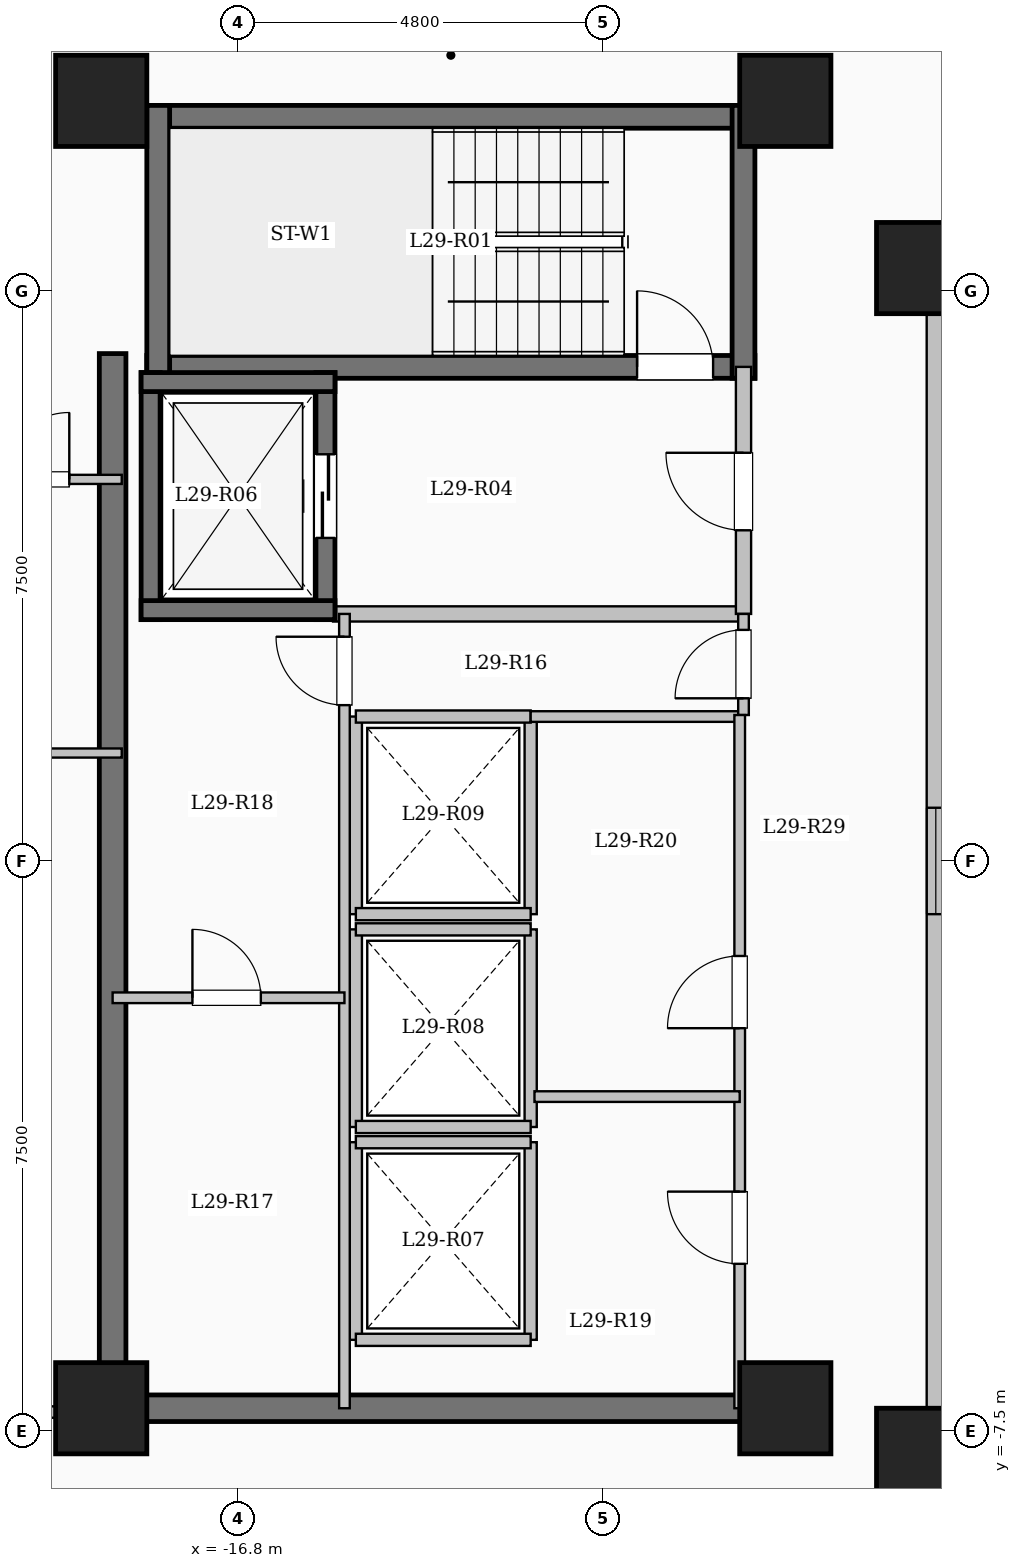
"""IFC4 building model, lengths in metres.
Left out: names, types, materials, properties, quantities, classifications, styles, units other than length and angle.
Written with IfcOpenShell. Run it as: python <this file> out.ifc"""

import sys

from ifc_helpers import new_model, si_unit, direction, frame, frame_2d, origin, origin_2d, place, context, subcontext, project, spatial, rectangle, extrude, element, fill, save


model = new_model("IFC4")
c1 = context("Model", 3, precision=1e-05, world=origin(), true_north=direction((0.0, 1.0)))
c2 = subcontext(c1, "Body", "Model", "MODEL_VIEW")
j1 = project(units=[si_unit("LENGTHUNIT", "METRE"), si_unit("PLANEANGLEUNIT", "RADIAN")], contexts=[c1])
p1 = place(None, origin())
s1 = spatial("IfcSite", under=j1, at=p1, CompositionType="ELEMENT")
p2 = place(p1, origin())
s2 = spatial("IfcBuilding", under=s1, at=p2, CompositionType="ELEMENT")
p3 = place(p2, frame((0.0, 0.0, 108.45)))
s3 = spatial("IfcBuildingStorey", under=s2, at=p3, CompositionType="ELEMENT", Elevation=108.45)
for number, where, z_axis, x_axis in (
    (1, (-7.8, -7.8, 0.0), (0.0, 0.0, 1.0), (1.0, 0.0, 0.0)),
    (2, (-7.8, 7.8, 0.0), (0.0, 0.0, 1.0), (1.0, 0.0, 0.0)),
    (3, (-9.6, -7.2, 0.0), (0.0, 0.0, 1.0), (1.0, 0.0, 0.0)),
    (4, (-9.6, 10.0, 0.0), (0.0, 0.0, 1.0), (1.0, 0.0, 0.0)),
    (5, (-18.6, -7.2, 0.0), (0.0, 0.0, 1.0), (1.0, 0.0, 0.0)),
    (6, (-18.6, 10.0, 0.0), (0.0, 0.0, 1.0), (1.0, 0.0, 0.0)),
):
    element("IfcColumn", number, at=place(p3, frame(where, z_axis=z_axis, x_axis=x_axis)), inside=s3, PredefinedType="COLUMN", context=c2, shape_type="SweptSolid", body=[
        extrude(rectangle(XDim=1.2, YDim=1.2, at=origin_2d()), origin(), (0.0, 0.0, 1.0), 3.35),
    ])
p4 = place(p3, frame((-7.62, -7.62, 0.0), z_axis=(0.0, 0.0, 1.0), x_axis=(1.0, 0.0, 0.0)))
e7 = element("IfcWall", 7, at=p4, inside=s3, PredefinedType="SOLIDWALL", context=c2, shape_type="SweptSolid", body=[
    extrude(rectangle(XDim=15.24, YDim=0.24, at=frame_2d((7.62, 0.0))), origin(), (0.0, 0.0, 1.0), 3.1),
])
p5 = place(p4, frame((6.92, 0.0, 0.95)))
e8 = element("IfcOpeningElement", 8, at=p5, cuts=e7, PredefinedType="OPENING", context=c2, shape_type="SweptSolid", body=[
    extrude(rectangle(XDim=1.4, YDim=1.5, at=frame_2d((0.7, 0.75))), frame((0.0, 0.13, 0.0), z_axis=(0.0, -1.0, 0.0), x_axis=(1.0, 0.0, 0.0)), (0.0, 0.0, 1.0), 0.26),
])
p6 = place(p3, frame((7.62, 7.62, 0.0), z_axis=(0.0, 0.0, 1.0), x_axis=(-1.0, 0.0, 0.0)))
e9 = element("IfcWall", 9, at=p6, inside=s3, PredefinedType="SOLIDWALL", context=c2, shape_type="SweptSolid", body=[
    extrude(rectangle(XDim=15.24, YDim=0.24, at=frame_2d((7.62, 0.0))), origin(), (0.0, 0.0, 1.0), 3.1),
])
p7 = place(p6, frame((6.92, 0.0, 0.95)))
e10 = element("IfcOpeningElement", 10, at=p7, cuts=e9, PredefinedType="OPENING", context=c2, shape_type="SweptSolid", body=[
    extrude(rectangle(XDim=1.4, YDim=1.5, at=frame_2d((0.7, 0.75))), frame((0.0, 0.13, 0.0), z_axis=(0.0, -1.0, 0.0), x_axis=(1.0, 0.0, 0.0)), (0.0, 0.0, 1.0), 0.26),
])
p8 = place(p3, frame((-7.62, 7.62, 0.0), z_axis=(0.0, 0.0, 1.0), x_axis=(0.0, -1.0, 0.0)))
e11 = element("IfcWall", 11, at=p8, inside=s3, PredefinedType="SOLIDWALL", context=c2, shape_type="SweptSolid", body=[
    extrude(rectangle(XDim=15.24, YDim=0.24, at=frame_2d((7.62, 0.0))), origin(), (0.0, 0.0, 1.0), 3.1),
])
p9 = place(p8, frame((6.92, 0.0, 0.95)))
e12 = element("IfcOpeningElement", 12, at=p9, cuts=e11, PredefinedType="OPENING", context=c2, shape_type="SweptSolid", body=[
    extrude(rectangle(XDim=1.4, YDim=1.5, at=frame_2d((0.7, 0.75))), frame((0.0, 0.13, 0.0), z_axis=(0.0, -1.0, 0.0), x_axis=(1.0, 0.0, 0.0)), (0.0, 0.0, 1.0), 0.26),
])
p10 = place(p3, frame((-18.0, 9.79, 0.0), z_axis=(0.0, 0.0, 1.0), x_axis=(1.0, 0.0, 0.0)))
e13 = element("IfcWall", 13, at=p10, inside=s3, PredefinedType="SHEAR", context=c2, shape_type="SweptSolid", body=[
    extrude(rectangle(XDim=8.0, YDim=0.3, at=frame_2d((4.0, 0.0))), origin(), (0.0, 0.0, 1.0), 3.35),
])
p11 = place(p3, frame((-18.0, 6.5, 0.0), z_axis=(0.0, 0.0, 1.0), x_axis=(1.0, 0.0, 0.0)))
e14 = element("IfcWall", 14, at=p11, inside=s3, PredefinedType="SHEAR", context=c2, shape_type="SweptSolid", body=[
    extrude(rectangle(XDim=8.0, YDim=0.3, at=frame_2d((4.0, 0.0))), origin(), (0.0, 0.0, 1.0), 3.35),
])
p12 = place(p11, frame((6.45, 0.0, 0.0)))
e15 = element("IfcOpeningElement", 15, at=p12, cuts=e14, PredefinedType="OPENING", context=c2, shape_type="SweptSolid", body=[
    extrude(rectangle(XDim=1.0, YDim=2.15, at=frame_2d((0.5, 1.075))), frame((0.0, 0.16, 0.0), z_axis=(0.0, -1.0, 0.0), x_axis=(1.0, 0.0, 0.0)), (0.0, 0.0, 1.0), 0.32),
])
for number, where, z_axis, x_axis in (
    (16, (-17.85, 6.35, 0.0), (0.0, 0.0, 1.0), (0.0, 1.0, 0.0)),
    (17, (-10.15, 6.35, 0.0), (0.0, 0.0, 1.0), (0.0, 1.0, 0.0)),
):
    element("IfcWall", number, at=place(p3, frame(where, z_axis=z_axis, x_axis=x_axis)), inside=s3, PredefinedType="SHEAR", context=c2, shape_type="SweptSolid", body=[
        extrude(rectangle(XDim=3.59, YDim=0.3, at=frame_2d((1.795, 0.0))), origin(), (0.0, 0.0, 1.0), 3.35),
    ])
p13 = place(p3, frame((-15.55, 3.25, 0.0), z_axis=(0.0, 0.0, 1.0), x_axis=(1.0, 0.0, 0.0)))
e18 = element("IfcWall", 18, at=p13, inside=s3, PredefinedType="SOLIDWALL", context=c2, shape_type="SweptSolid", body=[
    extrude(rectangle(XDim=5.4, YDim=0.2, at=frame_2d((2.7, 0.0))), origin(), (0.0, 0.0, 1.0), 3.1),
])
p14 = place(p3, frame((-10.15, 3.25, 0.0), z_axis=(0.0, 0.0, 1.0), x_axis=(0.0, 1.0, 0.0)))
e19 = element("IfcWall", 19, at=p14, inside=s3, PredefinedType="SOLIDWALL", context=c2, shape_type="SweptSolid", body=[
    extrude(rectangle(XDim=3.25, YDim=0.2, at=frame_2d((1.625, 0.0))), origin(), (0.0, 0.0, 1.0), 3.1),
])
p15 = place(p14, frame((1.1, 0.0, 0.0)))
e20 = element("IfcOpeningElement", 20, at=p15, cuts=e19, PredefinedType="OPENING", context=c2, shape_type="SweptSolid", body=[
    extrude(rectangle(XDim=1.02, YDim=2.15, at=frame_2d((0.51, 1.075))), frame((0.0, 0.11, 0.0), z_axis=(0.0, -1.0, 0.0), x_axis=(1.0, 0.0, 0.0)), (0.0, 0.0, 1.0), 0.22),
])
p16 = place(p3, frame((-17.95, 3.175, 0.0), z_axis=(0.0, 0.0, 1.0), x_axis=(0.0, 1.0, 0.0)))
e21 = element("IfcWall", 21, at=p16, inside=s3, PredefinedType="SHEAR", context=c2, shape_type="SweptSolid", body=[
    extrude(rectangle(XDim=3.25, YDim=0.25, at=frame_2d((1.625, 0.0))), origin(), (0.0, 0.0, 1.0), 3.35),
])
p17 = place(p3, frame((-15.65, 3.175, 0.0), z_axis=(0.0, 0.0, 1.0), x_axis=(0.0, 1.0, 0.0)))
e22 = element("IfcWall", 22, at=p17, inside=s3, PredefinedType="SHEAR", context=c2, shape_type="SweptSolid", body=[
    extrude(rectangle(XDim=3.25, YDim=0.25, at=frame_2d((1.625, 0.0))), origin(), (0.0, 0.0, 1.0), 3.35),
])
p18 = place(p17, frame((1.075, 0.0, 0.0)))
e23 = element("IfcOpeningElement", 23, at=p18, cuts=e22, PredefinedType="OPENING", context=c2, shape_type="SweptSolid", body=[
    extrude(rectangle(XDim=1.1, YDim=2.15, at=frame_2d((0.55, 1.075))), frame((0.0, 0.135, 0.0), z_axis=(0.0, -1.0, 0.0), x_axis=(1.0, 0.0, 0.0)), (0.0, 0.0, 1.0), 0.27),
])
for number, where, z_axis, x_axis in (
    (24, (-18.075, 3.3, 0.0), (0.0, 0.0, 1.0), (1.0, 0.0, 0.0)),
    (25, (-18.075, 6.3, 0.0), (0.0, 0.0, 1.0), (1.0, 0.0, 0.0)),
):
    element("IfcWall", number, at=place(p3, frame(where, z_axis=z_axis, x_axis=x_axis)), inside=s3, PredefinedType="SHEAR", context=c2, shape_type="SweptSolid", body=[
        extrude(rectangle(XDim=2.55, YDim=0.25, at=frame_2d((1.275, 0.0))), origin(), (0.0, 0.0, 1.0), 3.35),
    ])
for number, where, z_axis, x_axis in (
    (26, (-15.25, -6.3, 0.0), (0.0, 0.0, 1.0), (0.0, 1.0, 0.0)),
    (27, (-12.95, -6.3, 0.0), (0.0, 0.0, 1.0), (0.0, 1.0, 0.0)),
):
    element("IfcWall", number, at=place(p3, frame(where, z_axis=z_axis, x_axis=x_axis)), inside=s3, PredefinedType="SOLIDWALL", context=c2, shape_type="SweptSolid", body=[
        extrude(rectangle(XDim=2.6, YDim=0.16, at=frame_2d((1.3, 0.0))), origin(), (0.0, 0.0, 1.0), 3.1),
    ])
for number, where, z_axis, x_axis in (
    (28, (-15.25, -6.3, 0.0), (0.0, 0.0, 1.0), (1.0, 0.0, 0.0)),
    (29, (-15.25, -3.7, 0.0), (0.0, 0.0, 1.0), (1.0, 0.0, 0.0)),
):
    element("IfcWall", number, at=place(p3, frame(where, z_axis=z_axis, x_axis=x_axis)), inside=s3, PredefinedType="SOLIDWALL", context=c2, shape_type="SweptSolid", body=[
        extrude(rectangle(XDim=2.3, YDim=0.16, at=frame_2d((1.15, 0.0))), origin(), (0.0, 0.0, 1.0), 3.1),
    ])
for number, where, z_axis, x_axis in (
    (30, (-15.25, -3.5, 0.0), (0.0, 0.0, 1.0), (0.0, 1.0, 0.0)),
    (31, (-12.95, -3.5, 0.0), (0.0, 0.0, 1.0), (0.0, 1.0, 0.0)),
):
    element("IfcWall", number, at=place(p3, frame(where, z_axis=z_axis, x_axis=x_axis)), inside=s3, PredefinedType="SOLIDWALL", context=c2, shape_type="SweptSolid", body=[
        extrude(rectangle(XDim=2.6, YDim=0.16, at=frame_2d((1.3, 0.0))), origin(), (0.0, 0.0, 1.0), 3.1),
    ])
for number, where, z_axis, x_axis in (
    (32, (-15.25, -3.5, 0.0), (0.0, 0.0, 1.0), (1.0, 0.0, 0.0)),
    (33, (-15.25, -0.9, 0.0), (0.0, 0.0, 1.0), (1.0, 0.0, 0.0)),
):
    element("IfcWall", number, at=place(p3, frame(where, z_axis=z_axis, x_axis=x_axis)), inside=s3, PredefinedType="SOLIDWALL", context=c2, shape_type="SweptSolid", body=[
        extrude(rectangle(XDim=2.3, YDim=0.16, at=frame_2d((1.15, 0.0))), origin(), (0.0, 0.0, 1.0), 3.1),
    ])
for number, where, z_axis, x_axis in (
    (34, (-15.25, -0.7, 0.0), (0.0, 0.0, 1.0), (0.0, 1.0, 0.0)),
    (35, (-12.95, -0.7, 0.0), (0.0, 0.0, 1.0), (0.0, 1.0, 0.0)),
):
    element("IfcWall", number, at=place(p3, frame(where, z_axis=z_axis, x_axis=x_axis)), inside=s3, PredefinedType="SOLIDWALL", context=c2, shape_type="SweptSolid", body=[
        extrude(rectangle(XDim=2.6, YDim=0.16, at=frame_2d((1.3, 0.0))), origin(), (0.0, 0.0, 1.0), 3.1),
    ])
for number, where, z_axis, x_axis in (
    (36, (-15.25, -0.7, 0.0), (0.0, 0.0, 1.0), (1.0, 0.0, 0.0)),
    (37, (-15.25, 1.9, 0.0), (0.0, 0.0, 1.0), (1.0, 0.0, 0.0)),
):
    element("IfcWall", number, at=place(p3, frame(where, z_axis=z_axis, x_axis=x_axis)), inside=s3, PredefinedType="SOLIDWALL", context=c2, shape_type="SweptSolid", body=[
        extrude(rectangle(XDim=2.3, YDim=0.16, at=frame_2d((1.15, 0.0))), origin(), (0.0, 0.0, 1.0), 3.1),
    ])
p19 = place(p3, frame((-18.45, -7.375, 0.0), z_axis=(0.0, 0.0, 1.0), x_axis=(0.0, 1.0, 0.0)))
e38 = element("IfcWall", 38, at=p19, inside=s3, PredefinedType="SHEAR", context=c2, shape_type="SweptSolid", body=[
    extrude(rectangle(XDim=14.05, YDim=0.35, at=frame_2d((7.025, 0.0))), origin(), (0.0, 0.0, 1.0), 3.35),
])
p20 = place(p3, frame((-18.625, -7.2, 0.0), z_axis=(0.0, 0.0, 1.0), x_axis=(1.0, 0.0, 0.0)))
e39 = element("IfcWall", 39, at=p20, inside=s3, PredefinedType="SHEAR", context=c2, shape_type="SweptSolid", body=[
    extrude(rectangle(XDim=8.55, YDim=0.35, at=frame_2d((4.275, 0.0))), origin(), (0.0, 0.0, 1.0), 3.35),
])
p21 = place(p3, frame((-12.95, 1.9, 0.0), z_axis=(0.0, 0.0, 1.0), x_axis=(1.0, 0.0, 0.0)))
e40 = element("IfcWall", 40, at=p21, inside=s3, PredefinedType="PARTITIONING", context=c2, shape_type="SweptSolid", body=[
    extrude(rectangle(XDim=2.8, YDim=0.14, at=frame_2d((1.4, 0.0))), origin(), (0.0, 0.0, 1.0), 3.1),
])
p22 = place(p3, frame((-10.15, 1.92, 0.0), z_axis=(0.0, 0.0, 1.0), x_axis=(0.0, 1.0, 0.0)))
e41 = element("IfcWall", 41, at=p22, inside=s3, PredefinedType="PARTITIONING", context=c2, shape_type="SweptSolid", body=[
    extrude(rectangle(XDim=1.33, YDim=0.14, at=frame_2d((0.665, 0.0))), origin(), (0.0, 0.0, 1.0), 3.1),
])
p23 = place(p22, frame((0.22, 0.0, 0.0)))
e42 = element("IfcOpeningElement", 42, at=p23, cuts=e41, PredefinedType="OPENING", context=c2, shape_type="SweptSolid", body=[
    extrude(rectangle(XDim=0.9, YDim=2.08, at=frame_2d((0.45, 1.04))), frame((0.0, 0.08, 0.0), z_axis=(0.0, -1.0, 0.0), x_axis=(1.0, 0.0, 0.0)), (0.0, 0.0, 1.0), 0.16),
])
p24 = place(p3, frame((-15.4, -7.2, 0.0), z_axis=(0.0, 0.0, 1.0), x_axis=(0.0, 1.0, 0.0)))
e43 = element("IfcWall", 43, at=p24, inside=s3, PredefinedType="PARTITIONING", context=c2, shape_type="SweptSolid", body=[
    extrude(rectangle(XDim=10.45, YDim=0.14, at=frame_2d((5.225, 0.0))), origin(), (0.0, 0.0, 1.0), 3.1),
])
p25 = place(p24, frame((9.25, 0.0, 0.0)))
e44 = element("IfcOpeningElement", 44, at=p25, cuts=e43, PredefinedType="OPENING", context=c2, shape_type="SweptSolid", body=[
    extrude(rectangle(XDim=0.9, YDim=2.08, at=frame_2d((0.45, 1.04))), frame((0.0, 0.08, 0.0), z_axis=(0.0, -1.0, 0.0), x_axis=(1.0, 0.0, 0.0)), (0.0, 0.0, 1.0), 0.16),
])
p26 = place(p3, frame((-18.45, -1.8, 0.0), z_axis=(0.0, 0.0, 1.0), x_axis=(1.0, 0.0, 0.0)))
e45 = element("IfcWall", 45, at=p26, inside=s3, PredefinedType="PARTITIONING", context=c2, shape_type="SweptSolid", body=[
    extrude(rectangle(XDim=3.05, YDim=0.14, at=frame_2d((1.525, 0.0))), origin(), (0.0, 0.0, 1.0), 3.1),
])
p27 = place(p26, frame((1.05, 0.0, 0.0)))
e46 = element("IfcOpeningElement", 46, at=p27, cuts=e45, PredefinedType="OPENING", context=c2, shape_type="SweptSolid", body=[
    extrude(rectangle(XDim=0.9, YDim=2.08, at=frame_2d((0.45, 1.04))), frame((0.0, 0.08, 0.0), z_axis=(0.0, -1.0, 0.0), x_axis=(1.0, 0.0, 0.0)), (0.0, 0.0, 1.0), 0.16),
])
p28 = place(p3, frame((-10.2, -7.2, 0.0), z_axis=(0.0, 0.0, 1.0), x_axis=(0.0, 1.0, 0.0)))
e47 = element("IfcWall", 47, at=p28, inside=s3, PredefinedType="PARTITIONING", context=c2, shape_type="SweptSolid", body=[
    extrude(rectangle(XDim=9.12, YDim=0.14, at=frame_2d((4.56, 0.0))), origin(), (0.0, 0.0, 1.0), 3.1),
])
p29 = place(p28, frame((1.9, 0.0, 0.0)))
e48 = element("IfcOpeningElement", 48, at=p29, cuts=e47, PredefinedType="OPENING", context=c2, shape_type="SweptSolid", body=[
    extrude(rectangle(XDim=0.95, YDim=2.12, at=frame_2d((0.475, 1.06))), frame((0.0, 0.08, 0.0), z_axis=(0.0, -1.0, 0.0), x_axis=(1.0, 0.0, 0.0)), (0.0, 0.0, 1.0), 0.16),
])
p30 = place(p28, frame((5.0, 0.0, 0.0)))
e49 = element("IfcOpeningElement", 49, at=p30, cuts=e47, PredefinedType="OPENING", context=c2, shape_type="SweptSolid", body=[
    extrude(rectangle(XDim=0.95, YDim=2.12, at=frame_2d((0.475, 1.06))), frame((0.0, 0.08, 0.0), z_axis=(0.0, -1.0, 0.0), x_axis=(1.0, 0.0, 0.0)), (0.0, 0.0, 1.0), 0.16),
])
p31 = place(p3, frame((-12.9, -3.1, 0.0), z_axis=(0.0, 0.0, 1.0), x_axis=(1.0, 0.0, 0.0)))
e50 = element("IfcWall", 50, at=p31, inside=s3, PredefinedType="PARTITIONING", context=c2, shape_type="SweptSolid", body=[
    extrude(rectangle(XDim=2.7, YDim=0.14, at=frame_2d((1.35, 0.0))), origin(), (0.0, 0.0, 1.0), 3.1),
])
p32 = place(p3, frame((-26.88, -7.25, 0.0), z_axis=(0.0, 0.0, 1.0), x_axis=(1.0, 0.0, 0.0)))
e51 = element("IfcWall", 51, at=p32, inside=s3, PredefinedType="PARTITIONING", context=c2, shape_type="SweptSolid", body=[
    extrude(rectangle(XDim=8.43, YDim=0.15, at=frame_2d((4.215, 0.0))), origin(), (0.0, 0.0, 1.0), 3.1),
])
p33 = place(p32, frame((5.33, 0.0, 0.0)))
e52 = element("IfcOpeningElement", 52, at=p33, cuts=e51, PredefinedType="OPENING", context=c2, shape_type="SweptSolid", body=[
    extrude(rectangle(XDim=0.96, YDim=2.15, at=frame_2d((0.48, 1.075))), frame((0.0, 0.085, 0.0), z_axis=(0.0, -1.0, 0.0), x_axis=(1.0, 0.0, 0.0)), (0.0, 0.0, 1.0), 0.17),
])
p34 = place(p3, frame((-27.0, 1.42, 0.0), z_axis=(0.0, 0.0, 1.0), x_axis=(1.0, 0.0, 0.0)))
e53 = element("IfcWall", 53, at=p34, inside=s3, PredefinedType="PARTITIONING", context=c2, shape_type="SweptSolid", body=[
    extrude(rectangle(XDim=8.67, YDim=0.12, at=frame_2d((4.335, 0.0))), origin(), (0.0, 0.0, 1.0), 3.1),
])
p35 = place(p34, frame((1.763, 0.0, 0.0)))
e54 = element("IfcOpeningElement", 54, at=p35, cuts=e53, PredefinedType="OPENING", context=c2, shape_type="SweptSolid", body=[
    extrude(rectangle(XDim=0.88, YDim=2.1, at=frame_2d((0.44, 1.05))), frame((0.0, 0.07, 0.0), z_axis=(0.0, -1.0, 0.0), x_axis=(1.0, 0.0, 0.0)), (0.0, 0.0, 1.0), 0.14),
])
p36 = place(p34, frame((5.928, 0.0, 0.0)))
e55 = element("IfcOpeningElement", 55, at=p36, cuts=e53, PredefinedType="OPENING", context=c2, shape_type="SweptSolid", body=[
    extrude(rectangle(XDim=0.88, YDim=2.1, at=frame_2d((0.44, 1.05))), frame((0.0, 0.07, 0.0), z_axis=(0.0, -1.0, 0.0), x_axis=(1.0, 0.0, 0.0)), (0.0, 0.0, 1.0), 0.14),
])
p37 = place(p3, frame((-27.0, 5.02, 0.0), z_axis=(0.0, 0.0, 1.0), x_axis=(1.0, 0.0, 0.0)))
e56 = element("IfcWall", 56, at=p37, inside=s3, PredefinedType="PARTITIONING", context=c2, shape_type="SweptSolid", body=[
    extrude(rectangle(XDim=8.67, YDim=0.12, at=frame_2d((4.335, 0.0))), origin(), (0.0, 0.0, 1.0), 3.1),
])
p38 = place(p37, frame((7.1, 0.0, 0.0)))
e57 = element("IfcOpeningElement", 57, at=p38, cuts=e56, PredefinedType="OPENING", context=c2, shape_type="SweptSolid", body=[
    extrude(rectangle(XDim=0.88, YDim=2.1, at=frame_2d((0.44, 1.05))), frame((0.0, 0.07, 0.0), z_axis=(0.0, -1.0, 0.0), x_axis=(1.0, 0.0, 0.0)), (0.0, 0.0, 1.0), 0.14),
])
p39 = place(p9, origin())
e58 = element("IfcWindow", 58, at=p39, inside=s3, PartitioningType="SINGLE_PANEL", PredefinedType="WINDOW", context=c2, shape_type="SweptSolid", body=[
    extrude(rectangle(XDim=1.4, YDim=1.5, at=frame_2d((0.7, 0.75))), frame((0.0, 0.03, 0.0), z_axis=(0.0, -1.0, 0.0), x_axis=(1.0, 0.0, 0.0)), (0.0, 0.0, 1.0), 0.06),
])
fill(e12, e58)
p40 = place(p12, origin())
e59 = element("IfcDoor", 59, at=p40, inside=s3, OperationType="SINGLE_SWING_LEFT", PredefinedType="DOOR", context=c2, shape_type="SweptSolid", body=[
    extrude(rectangle(XDim=1.0, YDim=2.15, at=frame_2d((0.5, 1.075))), frame((0.0, 0.025, 0.0), z_axis=(0.0, -1.0, 0.0), x_axis=(1.0, 0.0, 0.0)), (0.0, 0.0, 1.0), 0.05),
])
fill(e15, e59)
p41 = place(p15, origin())
e60 = element("IfcDoor", 60, at=p41, inside=s3, OperationType="SINGLE_SWING_RIGHT", PredefinedType="DOOR", context=c2, shape_type="SweptSolid", body=[
    extrude(rectangle(XDim=1.02, YDim=2.15, at=frame_2d((0.51, 1.075))), frame((0.0, 0.025, 0.0), z_axis=(0.0, -1.0, 0.0), x_axis=(1.0, 0.0, 0.0)), (0.0, 0.0, 1.0), 0.05),
])
fill(e20, e60)
p42 = place(p18, origin())
e61 = element("IfcDoor", 61, at=p42, inside=s3, OperationType="SLIDING_TO_LEFT", PredefinedType="DOOR", context=c2, shape_type="SweptSolid", body=[
    extrude(rectangle(XDim=1.1, YDim=2.15, at=frame_2d((0.55, 1.075))), frame((0.0, 0.025, 0.0), z_axis=(0.0, -1.0, 0.0), x_axis=(1.0, 0.0, 0.0)), (0.0, 0.0, 1.0), 0.05),
])
fill(e23, e61)
p43 = place(p23, origin())
e62 = element("IfcDoor", 62, at=p43, inside=s3, OperationType="SINGLE_SWING_LEFT", PredefinedType="DOOR", context=c2, shape_type="SweptSolid", body=[
    extrude(rectangle(XDim=0.9, YDim=2.08, at=frame_2d((0.45, 1.04))), frame((0.0, 0.025, 0.0), z_axis=(0.0, -1.0, 0.0), x_axis=(1.0, 0.0, 0.0)), (0.0, 0.0, 1.0), 0.05),
])
fill(e42, e62)
p44 = place(p25, origin())
e63 = element("IfcDoor", 63, at=p44, inside=s3, OperationType="SINGLE_SWING_RIGHT", PredefinedType="DOOR", context=c2, shape_type="SweptSolid", body=[
    extrude(rectangle(XDim=0.9, YDim=2.08, at=frame_2d((0.45, 1.04))), frame((0.0, 0.025, 0.0), z_axis=(0.0, -1.0, 0.0), x_axis=(1.0, 0.0, 0.0)), (0.0, 0.0, 1.0), 0.05),
])
fill(e44, e63)
p45 = place(p27, origin())
e64 = element("IfcDoor", 64, at=p45, inside=s3, OperationType="SINGLE_SWING_LEFT", PredefinedType="DOOR", context=c2, shape_type="SweptSolid", body=[
    extrude(rectangle(XDim=0.9, YDim=2.08, at=frame_2d((0.45, 1.04))), frame((0.0, 0.025, 0.0), z_axis=(0.0, -1.0, 0.0), x_axis=(1.0, 0.0, 0.0)), (0.0, 0.0, 1.0), 0.05),
])
fill(e46, e64)
p46 = place(p29, origin())
e65 = element("IfcDoor", 65, at=p46, inside=s3, OperationType="SINGLE_SWING_RIGHT", PredefinedType="DOOR", context=c2, shape_type="SweptSolid", body=[
    extrude(rectangle(XDim=0.95, YDim=2.12, at=frame_2d((0.475, 1.06))), frame((0.0, 0.025, 0.0), z_axis=(0.0, -1.0, 0.0), x_axis=(1.0, 0.0, 0.0)), (0.0, 0.0, 1.0), 0.05),
])
fill(e48, e65)
p47 = place(p30, origin())
e66 = element("IfcDoor", 66, at=p47, inside=s3, OperationType="SINGLE_SWING_LEFT", PredefinedType="DOOR", context=c2, shape_type="SweptSolid", body=[
    extrude(rectangle(XDim=0.95, YDim=2.12, at=frame_2d((0.475, 1.06))), frame((0.0, 0.025, 0.0), z_axis=(0.0, -1.0, 0.0), x_axis=(1.0, 0.0, 0.0)), (0.0, 0.0, 1.0), 0.05),
])
fill(e49, e66)
p48 = place(p38, origin())
e67 = element("IfcDoor", 67, at=p48, inside=s3, OperationType="SINGLE_SWING_RIGHT", PredefinedType="DOOR", context=c2, shape_type="SweptSolid", body=[
    extrude(rectangle(XDim=0.88, YDim=2.1, at=frame_2d((0.44, 1.05))), frame((0.0, 0.025, 0.0), z_axis=(0.0, -1.0, 0.0), x_axis=(1.0, 0.0, 0.0)), (0.0, 0.0, 1.0), 0.05),
])
fill(e57, e67)
save(model, sys.argv[1])
